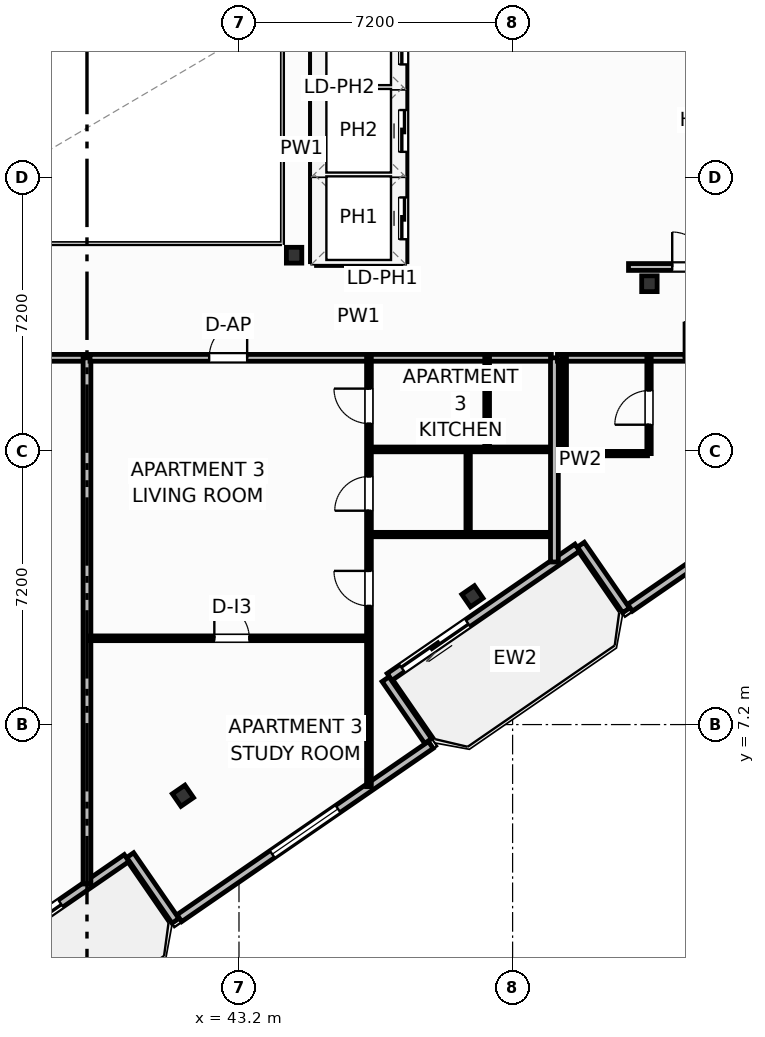
"""IFC4 building model, lengths in metres.
Left out: names, types, materials, properties, quantities, classifications, styles, units other than length and angle.
Written with IfcOpenShell. Run it as: python <this file> out.ifc"""

import sys

from ifc_helpers import new_model, si_unit, direction, frame, frame_2d, origin, origin_2d, place, context, subcontext, project, spatial, rectangle, i_section, extrude, element, fill, save


model = new_model("IFC4")
c1 = context("Model", 3, precision=1e-05, world=origin(), true_north=direction((0.0, 1.0)))
c2 = subcontext(c1, "Body", "Model", "MODEL_VIEW")
j1 = project(units=[si_unit("LENGTHUNIT", "METRE"), si_unit("PLANEANGLEUNIT", "RADIAN")], contexts=[c1])
p1 = place(None, origin())
s1 = spatial("IfcSite", under=j1, at=p1, CompositionType="ELEMENT")
p2 = place(p1, origin())
s2 = spatial("IfcBuilding", under=s1, at=p2, CompositionType="ELEMENT")
p3 = place(p2, frame((0.0, 0.0, 273.0)))
s3 = spatial("IfcBuildingStorey", under=s2, at=p3, CompositionType="ELEMENT", Elevation=273.0)
for number, where, z_axis, x_axis in (
    (1, (44.65, 19.55, 0.0), (0.0, 0.0, 1.0), (1.0, 0.0, 0.0)),
    (2, (54.0, 18.8, 0.0), (0.0, 0.0, 1.0), (1.0, 0.0, 0.0)),
):
    element("IfcColumn", number, at=place(p3, frame(where, z_axis=z_axis, x_axis=x_axis)), inside=s3, PredefinedType="COLUMN", context=c2, shape_type="SweptSolid", body=[
        extrude(i_section(OverallWidth=0.406, OverallDepth=0.416, WebThickness=0.03, FlangeThickness=0.048, FilletRadius=0.025, at=origin_2d()), origin(), (0.0, 0.0, 1.0), 3.7),
    ])
for number, where, z_axis, x_axis in (
    (3, (41.725, 5.328, 0.0), (0.0, 0.0, 1.0), (0.824, 0.567, 0.0)),
    (4, (49.343, 10.575, 0.0), (0.0, 0.0, 1.0), (0.824, 0.567, 0.0)),
):
    element("IfcColumn", number, at=place(p3, frame(where, z_axis=z_axis, x_axis=x_axis)), inside=s3, PredefinedType="COLUMN", context=c2, shape_type="SweptSolid", body=[
        extrude(i_section(OverallWidth=0.401, OverallDepth=0.399, WebThickness=0.025, FlangeThickness=0.04, FilletRadius=0.022, at=origin_2d()), origin(), (0.0, 0.0, 1.0), 3.7),
    ])
p4 = place(p3, frame((40.244, 3.688, 0.0), z_axis=(0.0, 0.0, 1.0), x_axis=(-0.823541290762, -0.567256328665, 0.0)))
e5 = element("IfcWall", 5, at=p4, inside=s3, PredefinedType="SOLIDWALL", context=c2, shape_type="SweptSolid", body=[
    extrude(rectangle(XDim=5.567, YDim=0.22, at=frame_2d((2.784, 0.0))), origin(), (0.0, 0.0, 1.0), 2.73),
])
p5 = place(p4, frame((2.107, 0.0, 0.0)))
e6 = element("IfcOpeningElement", 6, at=p5, cuts=e5, PredefinedType="OPENING", context=c2, shape_type="SweptSolid", body=[
    extrude(rectangle(XDim=2.1, YDim=2.3, at=frame_2d((1.05, 1.15))), frame((0.0, 0.12, 0.0), z_axis=(0.0, -1.0, 0.0), x_axis=(1.0, 0.0, 0.0)), (0.0, 0.0, 1.0), 0.24),
])
p6 = place(p3, frame((52.103, 11.857, 0.0), z_axis=(0.0, 0.0, 1.0), x_axis=(-0.823534636215, -0.567265989598, 0.0)))
e7 = element("IfcWall", 7, at=p6, inside=s3, PredefinedType="SOLIDWALL", context=c2, shape_type="SweptSolid", body=[
    extrude(rectangle(XDim=6.0, YDim=0.22, at=frame_2d((3.0, 0.0))), origin(), (0.0, 0.0, 1.0), 2.73),
])
p7 = place(p6, frame((3.5, 0.0, 0.0)))
e8 = element("IfcOpeningElement", 8, at=p7, cuts=e7, PredefinedType="OPENING", context=c2, shape_type="SweptSolid", body=[
    extrude(rectangle(XDim=2.1, YDim=2.3, at=frame_2d((1.05, 1.15))), frame((0.0, 0.12, 0.0), z_axis=(0.0, -1.0, 0.0), x_axis=(1.0, 0.0, 0.0)), (0.0, 0.0, 1.0), 0.24),
])
p8 = place(p3, frame((40.337, 3.765, 0.0), z_axis=(0.0, 0.0, 1.0), x_axis=(0.567352541689, -0.823475010816, 0.0)))
e9 = element("IfcWall", 9, at=p8, inside=s3, PredefinedType="SOLIDWALL", context=c2, shape_type="SweptSolid", body=[
    extrude(rectangle(XDim=2.1, YDim=0.22, at=frame_2d((1.05, 0.0))), origin(), (0.0, 0.0, 1.0), 2.73),
])
p9 = place(p3, frame((41.631, 2.106, 0.0), z_axis=(0.0, 0.0, 1.0), x_axis=(0.823530942962, 0.56727135128, 0.0)))
e10 = element("IfcWall", 10, at=p9, inside=s3, PredefinedType="SOLIDWALL", context=c2, shape_type="SweptSolid", body=[
    extrude(rectangle(XDim=8.035, YDim=0.22, at=frame_2d((4.018, 0.0))), origin(), (0.0, 0.0, 1.0), 2.73),
])
p10 = place(p9, frame((2.968, 0.0, 0.8)))
e11 = element("IfcOpeningElement", 11, at=p10, cuts=e10, PredefinedType="OPENING", context=c2, shape_type="SweptSolid", body=[
    extrude(rectangle(XDim=2.1, YDim=1.75, at=frame_2d((1.05, 0.875))), frame((0.0, 0.12, 0.0), z_axis=(0.0, -1.0, 0.0), x_axis=(1.0, 0.0, 0.0)), (0.0, 0.0, 1.0), 0.24),
])
p11 = place(p3, frame((48.177, 6.767, 0.0), z_axis=(0.0, 0.0, 1.0), x_axis=(-0.567273565974, 0.823529417415, 0.0)))
e12 = element("IfcWall", 12, at=p11, inside=s3, PredefinedType="SOLIDWALL", context=c2, shape_type="SweptSolid", body=[
    extrude(rectangle(XDim=1.975, YDim=0.22, at=frame_2d((0.988, 0.0))), origin(), (0.0, 0.0, 1.0), 2.73),
])
p12 = place(p3, frame((52.196, 11.933, 0.0), z_axis=(0.0, 0.0, 1.0), x_axis=(0.56729822855, -0.823512428494, 0.0)))
e13 = element("IfcWall", 13, at=p12, inside=s3, PredefinedType="SOLIDWALL", context=c2, shape_type="SweptSolid", body=[
    extrude(rectangle(XDim=2.1, YDim=0.22, at=frame_2d((1.05, 0.0))), origin(), (0.0, 0.0, 1.0), 2.73),
])
p13 = place(p3, frame((53.49, 10.275, 0.0), z_axis=(0.0, 0.0, 1.0), x_axis=(0.823530942962, 0.56727135128, 0.0)))
e14 = element("IfcWall", 14, at=p13, inside=s3, PredefinedType="SOLIDWALL", context=c2, shape_type="SweptSolid", body=[
    extrude(rectangle(XDim=8.035, YDim=0.22, at=frame_2d((4.018, 0.0))), origin(), (0.0, 0.0, 1.0), 2.73),
])
p14 = place(p13, frame((2.968, 0.0, 0.8)))
e15 = element("IfcOpeningElement", 15, at=p14, cuts=e14, PredefinedType="OPENING", context=c2, shape_type="SweptSolid", body=[
    extrude(rectangle(XDim=2.1, YDim=1.75, at=frame_2d((1.05, 0.875))), frame((0.0, 0.12, 0.0), z_axis=(0.0, -1.0, 0.0), x_axis=(1.0, 0.0, 0.0)), (0.0, 0.0, 1.0), 0.24),
])
p15 = place(p3, frame((27.08, 16.85, 0.0), z_axis=(0.0, 0.0, 1.0), x_axis=(1.0, 0.0, 0.0)))
e16 = element("IfcWall", 16, at=p15, inside=s3, PredefinedType="PARTITIONING", context=c2, shape_type="SweptSolid", body=[
    extrude(rectangle(XDim=12.04, YDim=0.18, at=frame_2d((6.02, 0.0))), origin(), (0.0, 0.0, 1.0), 3.45),
])
p16 = place(p15, frame((3.328, 0.0, 0.0)))
e17 = element("IfcOpeningElement", 17, at=p16, cuts=e16, PredefinedType="OPENING", context=c2, shape_type="SweptSolid", body=[
    extrude(rectangle(XDim=0.95, YDim=2.15, at=frame_2d((0.475, 1.075))), frame((0.0, 0.1, 0.0), z_axis=(0.0, -1.0, 0.0), x_axis=(1.0, 0.0, 0.0)), (0.0, 0.0, 1.0), 0.2),
])
p17 = place(p3, frame((39.2, 3.006, 0.0), z_axis=(0.0, 0.0, 1.0), x_axis=(0.0, 1.0, 0.0)))
e18 = element("IfcWall", 18, at=p17, inside=s3, PredefinedType="PARTITIONING", context=c2, shape_type="SweptSolid", body=[
    extrude(rectangle(XDim=13.844, YDim=0.205, at=frame_2d((6.922, 0.0))), origin(), (0.0, 0.0, 1.0), 3.45),
])
p18 = place(p3, frame((39.28, 9.47, 0.0), z_axis=(0.0, 0.0, 1.0), x_axis=(1.0, 0.0, 0.0)))
e19 = element("IfcWall", 19, at=p18, inside=s3, PredefinedType="PARTITIONING", context=c2, shape_type="SweptSolid", body=[
    extrude(rectangle(XDim=7.27, YDim=0.125, at=frame_2d((3.635, 0.0))), origin(), (0.0, 0.0, 1.0), 3.45),
])
p19 = place(p18, frame((3.271, 0.0, 0.0)))
e20 = element("IfcOpeningElement", 20, at=p19, cuts=e19, PredefinedType="OPENING", context=c2, shape_type="SweptSolid", body=[
    extrude(rectangle(XDim=0.92, YDim=2.05, at=frame_2d((0.46, 1.025))), frame((0.0, 0.073, 0.0), z_axis=(0.0, -1.0, 0.0), x_axis=(1.0, 0.0, 0.0)), (0.0, 0.0, 1.0), 0.145),
])
p20 = place(p3, frame((39.28, 16.85, 0.0), z_axis=(0.0, 0.0, 1.0), x_axis=(1.0, 0.0, 0.0)))
e21 = element("IfcWall", 21, at=p20, inside=s3, PredefinedType="PARTITIONING", context=c2, shape_type="SweptSolid", body=[
    extrude(rectangle(XDim=12.14, YDim=0.18, at=frame_2d((6.07, 0.0))), origin(), (0.0, 0.0, 1.0), 3.45),
])
p21 = place(p20, frame((3.135, 0.0, 0.0)))
e22 = element("IfcOpeningElement", 22, at=p21, cuts=e21, PredefinedType="OPENING", context=c2, shape_type="SweptSolid", body=[
    extrude(rectangle(XDim=1.0, YDim=2.2, at=frame_2d((0.5, 1.1))), frame((0.0, 0.1, 0.0), z_axis=(0.0, -1.0, 0.0), x_axis=(1.0, 0.0, 0.0)), (0.0, 0.0, 1.0), 0.2),
])
p22 = place(p3, frame((46.62, 5.567, 0.0), z_axis=(0.0, 0.0, 1.0), x_axis=(0.0, 1.0, 0.0)))
e23 = element("IfcWall", 23, at=p22, inside=s3, PredefinedType="PARTITIONING", context=c2, shape_type="SweptSolid", body=[
    extrude(rectangle(XDim=11.283, YDim=0.125, at=frame_2d((5.642, 0.0))), origin(), (0.0, 0.0, 1.0), 3.45),
])
p23 = place(p22, frame((4.757, 0.0, 0.0)))
e24 = element("IfcOpeningElement", 24, at=p23, cuts=e23, PredefinedType="OPENING", context=c2, shape_type="SweptSolid", body=[
    extrude(rectangle(XDim=0.92, YDim=2.05, at=frame_2d((0.46, 1.025))), frame((0.0, 0.073, 0.0), z_axis=(0.0, -1.0, 0.0), x_axis=(1.0, 0.0, 0.0)), (0.0, 0.0, 1.0), 0.145),
])
p24 = place(p22, frame((7.26, 0.0, 0.0)))
e25 = element("IfcOpeningElement", 25, at=p24, cuts=e23, PredefinedType="OPENING", context=c2, shape_type="SweptSolid", body=[
    extrude(rectangle(XDim=0.9, YDim=2.05, at=frame_2d((0.45, 1.025))), frame((0.0, 0.073, 0.0), z_axis=(0.0, -1.0, 0.0), x_axis=(1.0, 0.0, 0.0)), (0.0, 0.0, 1.0), 0.145),
])
p25 = place(p22, frame((9.553, 0.0, 0.0)))
e26 = element("IfcOpeningElement", 26, at=p25, cuts=e23, PredefinedType="OPENING", context=c2, shape_type="SweptSolid", body=[
    extrude(rectangle(XDim=0.92, YDim=2.05, at=frame_2d((0.46, 1.025))), frame((0.0, 0.073, 0.0), z_axis=(0.0, -1.0, 0.0), x_axis=(1.0, 0.0, 0.0)), (0.0, 0.0, 1.0), 0.145),
])
p26 = place(p3, frame((46.69, 14.44, 0.0), z_axis=(0.0, 0.0, 1.0), x_axis=(1.0, 0.0, 0.0)))
e27 = element("IfcWall", 27, at=p26, inside=s3, PredefinedType="PARTITIONING", context=c2, shape_type="SweptSolid", body=[
    extrude(rectangle(XDim=4.73, YDim=0.125, at=frame_2d((2.365, 0.0))), origin(), (0.0, 0.0, 1.0), 3.45),
])
p27 = place(p3, frame((46.69, 12.2, 0.0), z_axis=(0.0, 0.0, 1.0), x_axis=(1.0, 0.0, 0.0)))
e28 = element("IfcWall", 28, at=p27, inside=s3, PredefinedType="PARTITIONING", context=c2, shape_type="SweptSolid", body=[
    extrude(rectangle(XDim=4.73, YDim=0.115, at=frame_2d((2.365, 0.0))), origin(), (0.0, 0.0, 1.0), 3.45),
])
p28 = place(p3, frame((49.73, 14.44, 0.0), z_axis=(0.0, 0.0, 1.0), x_axis=(0.0, 1.0, 0.0)))
e29 = element("IfcWall", 29, at=p28, inside=s3, PredefinedType="PARTITIONING", context=c2, shape_type="SweptSolid", body=[
    extrude(rectangle(XDim=2.41, YDim=0.125, at=frame_2d((1.205, 0.0))), origin(), (0.0, 0.0, 1.0), 3.45),
])
p29 = place(p3, frame((49.23, 12.2, 0.0), z_axis=(0.0, 0.0, 1.0), x_axis=(0.0, 1.0, 0.0)))
e30 = element("IfcWall", 30, at=p29, inside=s3, PredefinedType="PARTITIONING", context=c2, shape_type="SweptSolid", body=[
    extrude(rectangle(XDim=2.24, YDim=0.115, at=frame_2d((1.12, 0.0))), origin(), (0.0, 0.0, 1.0), 3.45),
])
p30 = place(p3, frame((51.5, 11.479, 0.0), z_axis=(0.0, 0.0, 1.0), x_axis=(0.0, 1.0, 0.0)))
e31 = element("IfcWall", 31, at=p30, inside=s3, PredefinedType="PARTITIONING", context=c2, shape_type="SweptSolid", body=[
    extrude(rectangle(XDim=5.372, YDim=0.205, at=frame_2d((2.686, 0.0))), origin(), (0.0, 0.0, 1.0), 3.45),
])
p31 = place(p3, frame((51.58, 16.85, 0.0), z_axis=(0.0, 0.0, 1.0), x_axis=(1.0, 0.0, 0.0)))
e32 = element("IfcWall", 32, at=p31, inside=s3, PredefinedType="PARTITIONING", context=c2, shape_type="SweptSolid", body=[
    extrude(rectangle(XDim=7.718, YDim=0.18, at=frame_2d((3.859, 0.0))), origin(), (0.0, 0.0, 1.0), 3.45),
])
p32 = place(p31, frame((3.326, 0.0, 0.0)))
e33 = element("IfcOpeningElement", 33, at=p32, cuts=e32, PredefinedType="OPENING", context=c2, shape_type="SweptSolid", body=[
    extrude(rectangle(XDim=0.95, YDim=2.15, at=frame_2d((0.475, 1.075))), frame((0.0, 0.1, 0.0), z_axis=(0.0, -1.0, 0.0), x_axis=(1.0, 0.0, 0.0)), (0.0, 0.0, 1.0), 0.2),
])
p33 = place(p3, frame((51.8, 14.33, 0.0), z_axis=(0.0, 0.0, 1.0), x_axis=(1.0, 0.0, 0.0)))
e34 = element("IfcWall", 34, at=p33, inside=s3, PredefinedType="PARTITIONING", context=c2, shape_type="SweptSolid", body=[
    extrude(rectangle(XDim=2.15, YDim=0.115, at=frame_2d((1.075, 0.0))), origin(), (0.0, 0.0, 1.0), 3.45),
])
p34 = place(p3, frame((53.99, 14.33, 0.0), z_axis=(0.0, 0.0, 1.0), x_axis=(0.0, 1.0, 0.0)))
e35 = element("IfcWall", 35, at=p34, inside=s3, PredefinedType="PARTITIONING", context=c2, shape_type="SweptSolid", body=[
    extrude(rectangle(XDim=2.52, YDim=0.115, at=frame_2d((1.26, 0.0))), origin(), (0.0, 0.0, 1.0), 3.45),
])
p35 = place(p34, frame((0.76, 0.0, 0.0)))
e36 = element("IfcOpeningElement", 36, at=p35, cuts=e35, PredefinedType="OPENING", context=c2, shape_type="SweptSolid", body=[
    extrude(rectangle(XDim=0.9, YDim=2.05, at=frame_2d((0.45, 1.025))), frame((0.0, 0.067, 0.0), z_axis=(0.0, -1.0, 0.0), x_axis=(1.0, 0.0, 0.0)), (0.0, 0.0, 1.0), 0.135),
])
p36 = place(p3, frame((51.76, 14.33, 0.0), z_axis=(0.0, 0.0, 1.0), x_axis=(0.0, 1.0, 0.0)))
e37 = element("IfcWall", 37, at=p36, inside=s3, PredefinedType="PARTITIONING", context=c2, shape_type="SweptSolid", body=[
    extrude(rectangle(XDim=2.52, YDim=0.115, at=frame_2d((1.26, 0.0))), origin(), (0.0, 0.0, 1.0), 3.45),
])
p37 = place(p3, frame((53.45, 19.24, 0.0), z_axis=(0.0, 0.0, 1.0), x_axis=(1.0, 0.0, 0.0)))
e38 = element("IfcWall", 38, at=p37, inside=s3, PredefinedType="PARTITIONING", context=c2, shape_type="SweptSolid", body=[
    extrude(rectangle(XDim=9.318, YDim=0.18, at=frame_2d((4.659, 0.0))), origin(), (0.0, 0.0, 1.0), 2.739),
])
p38 = place(p37, frame((1.15, 0.0, 0.0)))
e39 = element("IfcOpeningElement", 39, at=p38, cuts=e38, PredefinedType="OPENING", context=c2, shape_type="SweptSolid", body=[
    extrude(rectangle(XDim=0.92, YDim=2.05, at=frame_2d((0.46, 1.025))), frame((0.0, 0.1, 0.0), z_axis=(0.0, -1.0, 0.0), x_axis=(1.0, 0.0, 0.0)), (0.0, 0.0, 1.0), 0.2),
])
for number, where, z_axis, x_axis in (
    (40, (45.24, 21.675, 0.0), (0.0, 0.0, 1.0), (1.0, 0.0, 0.0)),
    (41, (45.24, 23.975, 0.0), (0.0, 0.0, 1.0), (1.0, 0.0, 0.0)),
):
    element("IfcWall", number, at=place(p3, frame(where, z_axis=z_axis, x_axis=x_axis)), inside=s3, PredefinedType="PARTITIONING", context=c2, shape_type="SweptSolid", body=[
        extrude(rectangle(XDim=2.22, YDim=0.2, at=frame_2d((1.11, 0.0))), origin(), (0.0, 0.0, 1.0), 3.45),
    ])
p39 = place(p3, frame((45.24, 19.38, 0.0), z_axis=(0.0, 0.0, 1.0), x_axis=(1.0, 0.0, 0.0)))
e42 = element("IfcWall", 42, at=p39, inside=s3, PredefinedType="PARTITIONING", context=c2, shape_type="SweptSolid", body=[
    extrude(rectangle(XDim=2.22, YDim=0.2, at=frame_2d((1.11, 0.0))), origin(), (0.0, 0.0, 1.0), 2.662),
])
p40 = place(p3, frame((45.18, 19.38, 0.0), z_axis=(0.0, 0.0, 1.0), x_axis=(0.0, 1.0, 0.0)))
e43 = element("IfcWall", 43, at=p40, inside=s3, PredefinedType="PARTITIONING", context=c2, shape_type="SweptSolid", body=[
    extrude(rectangle(XDim=6.9, YDim=0.2, at=frame_2d((3.45, 0.0))), origin(), (0.0, 0.0, 1.0), 3.45),
])
p41 = place(p3, frame((47.52, 19.38, 0.0), z_axis=(0.0, 0.0, 1.0), x_axis=(0.0, 1.0, 0.0)))
e44 = element("IfcWall", 44, at=p41, inside=s3, PredefinedType="PARTITIONING", context=c2, shape_type="SweptSolid", body=[
    extrude(rectangle(XDim=6.9, YDim=0.2, at=frame_2d((3.45, 0.0))), origin(), (0.0, 0.0, 1.0), 3.45),
])
p42 = place(p41, frame((0.59, 0.0, 0.0)))
e45 = element("IfcOpeningElement", 45, at=p42, cuts=e44, PredefinedType="OPENING", context=c2, shape_type="SweptSolid", body=[
    extrude(rectangle(XDim=1.1, YDim=2.15, at=frame_2d((0.55, 1.075))), frame((0.0, 0.11, 0.0), z_axis=(0.0, -1.0, 0.0), x_axis=(1.0, 0.0, 0.0)), (0.0, 0.0, 1.0), 0.22),
])
p43 = place(p41, frame((2.89, 0.0, 0.0)))
e46 = element("IfcOpeningElement", 46, at=p43, cuts=e44, PredefinedType="OPENING", context=c2, shape_type="SweptSolid", body=[
    extrude(rectangle(XDim=1.1, YDim=2.15, at=frame_2d((0.55, 1.075))), frame((0.0, 0.11, 0.0), z_axis=(0.0, -1.0, 0.0), x_axis=(1.0, 0.0, 0.0)), (0.0, 0.0, 1.0), 0.22),
])
p44 = place(p41, frame((5.19, 0.0, 0.0)))
e47 = element("IfcOpeningElement", 47, at=p44, cuts=e44, PredefinedType="OPENING", context=c2, shape_type="SweptSolid", body=[
    extrude(rectangle(XDim=1.1, YDim=2.15, at=frame_2d((0.55, 1.075))), frame((0.0, 0.11, 0.0), z_axis=(0.0, -1.0, 0.0), x_axis=(1.0, 0.0, 0.0)), (0.0, 0.0, 1.0), 0.22),
])
p45 = place(p5, origin())
e48 = element("IfcDoor", 48, at=p45, inside=s3, OperationType="SLIDING_TO_LEFT", PredefinedType="DOOR", context=c2, shape_type="SweptSolid", body=[
    extrude(rectangle(XDim=2.1, YDim=2.3, at=frame_2d((1.05, 1.15))), frame((0.0, 0.025, 0.0), z_axis=(0.0, -1.0, 0.0), x_axis=(1.0, 0.0, 0.0)), (0.0, 0.0, 1.0), 0.05),
])
fill(e6, e48)
p46 = place(p7, origin())
e49 = element("IfcDoor", 49, at=p46, inside=s3, OperationType="SLIDING_TO_LEFT", PredefinedType="DOOR", context=c2, shape_type="SweptSolid", body=[
    extrude(rectangle(XDim=2.1, YDim=2.3, at=frame_2d((1.05, 1.15))), frame((0.0, 0.025, 0.0), z_axis=(0.0, -1.0, 0.0), x_axis=(1.0, 0.0, 0.0)), (0.0, 0.0, 1.0), 0.05),
])
fill(e8, e49)
p47 = place(p10, origin())
e50 = element("IfcWindow", 50, at=p47, inside=s3, PartitioningType="SINGLE_PANEL", PredefinedType="WINDOW", context=c2, shape_type="SweptSolid", body=[
    extrude(rectangle(XDim=2.1, YDim=1.75, at=frame_2d((1.05, 0.875))), frame((0.0, 0.03, 0.0), z_axis=(0.0, -1.0, 0.0), x_axis=(1.0, 0.0, 0.0)), (0.0, 0.0, 1.0), 0.06),
])
fill(e11, e50)
p48 = place(p19, origin())
e51 = element("IfcDoor", 51, at=p48, inside=s3, OperationType="SINGLE_SWING_LEFT", PredefinedType="DOOR", context=c2, shape_type="SweptSolid", body=[
    extrude(rectangle(XDim=0.92, YDim=2.05, at=frame_2d((0.46, 1.025))), frame((0.0, 0.025, 0.0), z_axis=(0.0, -1.0, 0.0), x_axis=(1.0, 0.0, 0.0)), (0.0, 0.0, 1.0), 0.05),
])
fill(e20, e51)
p49 = place(p21, origin())
e52 = element("IfcDoor", 52, at=p49, inside=s3, OperationType="SINGLE_SWING_RIGHT", PredefinedType="DOOR", context=c2, shape_type="SweptSolid", body=[
    extrude(rectangle(XDim=1.0, YDim=2.2, at=frame_2d((0.5, 1.1))), frame((0.0, 0.025, 0.0), z_axis=(0.0, -1.0, 0.0), x_axis=(1.0, 0.0, 0.0)), (0.0, 0.0, 1.0), 0.05),
])
fill(e22, e52)
p50 = place(p23, origin())
e53 = element("IfcDoor", 53, at=p50, inside=s3, OperationType="SINGLE_SWING_RIGHT", PredefinedType="DOOR", context=c2, shape_type="SweptSolid", body=[
    extrude(rectangle(XDim=0.92, YDim=2.05, at=frame_2d((0.46, 1.025))), frame((0.0, 0.025, 0.0), z_axis=(0.0, -1.0, 0.0), x_axis=(1.0, 0.0, 0.0)), (0.0, 0.0, 1.0), 0.05),
])
fill(e24, e53)
p51 = place(p24, origin())
e54 = element("IfcDoor", 54, at=p51, inside=s3, OperationType="SINGLE_SWING_LEFT", PredefinedType="DOOR", context=c2, shape_type="SweptSolid", body=[
    extrude(rectangle(XDim=0.9, YDim=2.05, at=frame_2d((0.45, 1.025))), frame((0.0, 0.025, 0.0), z_axis=(0.0, -1.0, 0.0), x_axis=(1.0, 0.0, 0.0)), (0.0, 0.0, 1.0), 0.05),
])
fill(e25, e54)
p52 = place(p25, origin())
e55 = element("IfcDoor", 55, at=p52, inside=s3, OperationType="SINGLE_SWING_RIGHT", PredefinedType="DOOR", context=c2, shape_type="SweptSolid", body=[
    extrude(rectangle(XDim=0.92, YDim=2.05, at=frame_2d((0.46, 1.025))), frame((0.0, 0.025, 0.0), z_axis=(0.0, -1.0, 0.0), x_axis=(1.0, 0.0, 0.0)), (0.0, 0.0, 1.0), 0.05),
])
fill(e26, e55)
p53 = place(p32, origin())
e56 = element("IfcDoor", 56, at=p53, inside=s3, OperationType="SINGLE_SWING_LEFT", PredefinedType="DOOR", context=c2, shape_type="SweptSolid", body=[
    extrude(rectangle(XDim=0.95, YDim=2.15, at=frame_2d((0.475, 1.075))), frame((0.0, 0.025, 0.0), z_axis=(0.0, -1.0, 0.0), x_axis=(1.0, 0.0, 0.0)), (0.0, 0.0, 1.0), 0.05),
])
fill(e33, e56)
p54 = place(p35, origin())
e57 = element("IfcDoor", 57, at=p54, inside=s3, OperationType="SINGLE_SWING_LEFT", PredefinedType="DOOR", context=c2, shape_type="SweptSolid", body=[
    extrude(rectangle(XDim=0.9, YDim=2.05, at=frame_2d((0.45, 1.025))), frame((0.0, 0.025, 0.0), z_axis=(0.0, -1.0, 0.0), x_axis=(1.0, 0.0, 0.0)), (0.0, 0.0, 1.0), 0.05),
])
fill(e36, e57)
p55 = place(p38, origin())
e58 = element("IfcDoor", 58, at=p55, inside=s3, OperationType="SINGLE_SWING_LEFT", PredefinedType="DOOR", context=c2, shape_type="SweptSolid", body=[
    extrude(rectangle(XDim=0.92, YDim=2.05, at=frame_2d((0.46, 1.025))), frame((0.0, 0.025, 0.0), z_axis=(0.0, -1.0, 0.0), x_axis=(1.0, 0.0, 0.0)), (0.0, 0.0, 1.0), 0.05),
])
fill(e39, e58)
p56 = place(p42, origin())
e59 = element("IfcDoor", 59, at=p56, inside=s3, OperationType="SLIDING_TO_LEFT", PredefinedType="DOOR", context=c2, shape_type="SweptSolid", body=[
    extrude(rectangle(XDim=1.1, YDim=2.15, at=frame_2d((0.55, 1.075))), frame((0.0, 0.025, 0.0), z_axis=(0.0, -1.0, 0.0), x_axis=(1.0, 0.0, 0.0)), (0.0, 0.0, 1.0), 0.05),
])
fill(e45, e59)
p57 = place(p43, origin())
e60 = element("IfcDoor", 60, at=p57, inside=s3, OperationType="SLIDING_TO_LEFT", PredefinedType="DOOR", context=c2, shape_type="SweptSolid", body=[
    extrude(rectangle(XDim=1.1, YDim=2.15, at=frame_2d((0.55, 1.075))), frame((0.0, 0.025, 0.0), z_axis=(0.0, -1.0, 0.0), x_axis=(1.0, 0.0, 0.0)), (0.0, 0.0, 1.0), 0.05),
])
fill(e46, e60)
p58 = place(p44, origin())
e61 = element("IfcDoor", 61, at=p58, inside=s3, OperationType="SLIDING_TO_LEFT", PredefinedType="DOOR", context=c2, shape_type="SweptSolid", body=[
    extrude(rectangle(XDim=1.1, YDim=2.15, at=frame_2d((0.55, 1.075))), frame((0.0, 0.025, 0.0), z_axis=(0.0, -1.0, 0.0), x_axis=(1.0, 0.0, 0.0)), (0.0, 0.0, 1.0), 0.05),
])
fill(e47, e61)
save(model, sys.argv[1])
